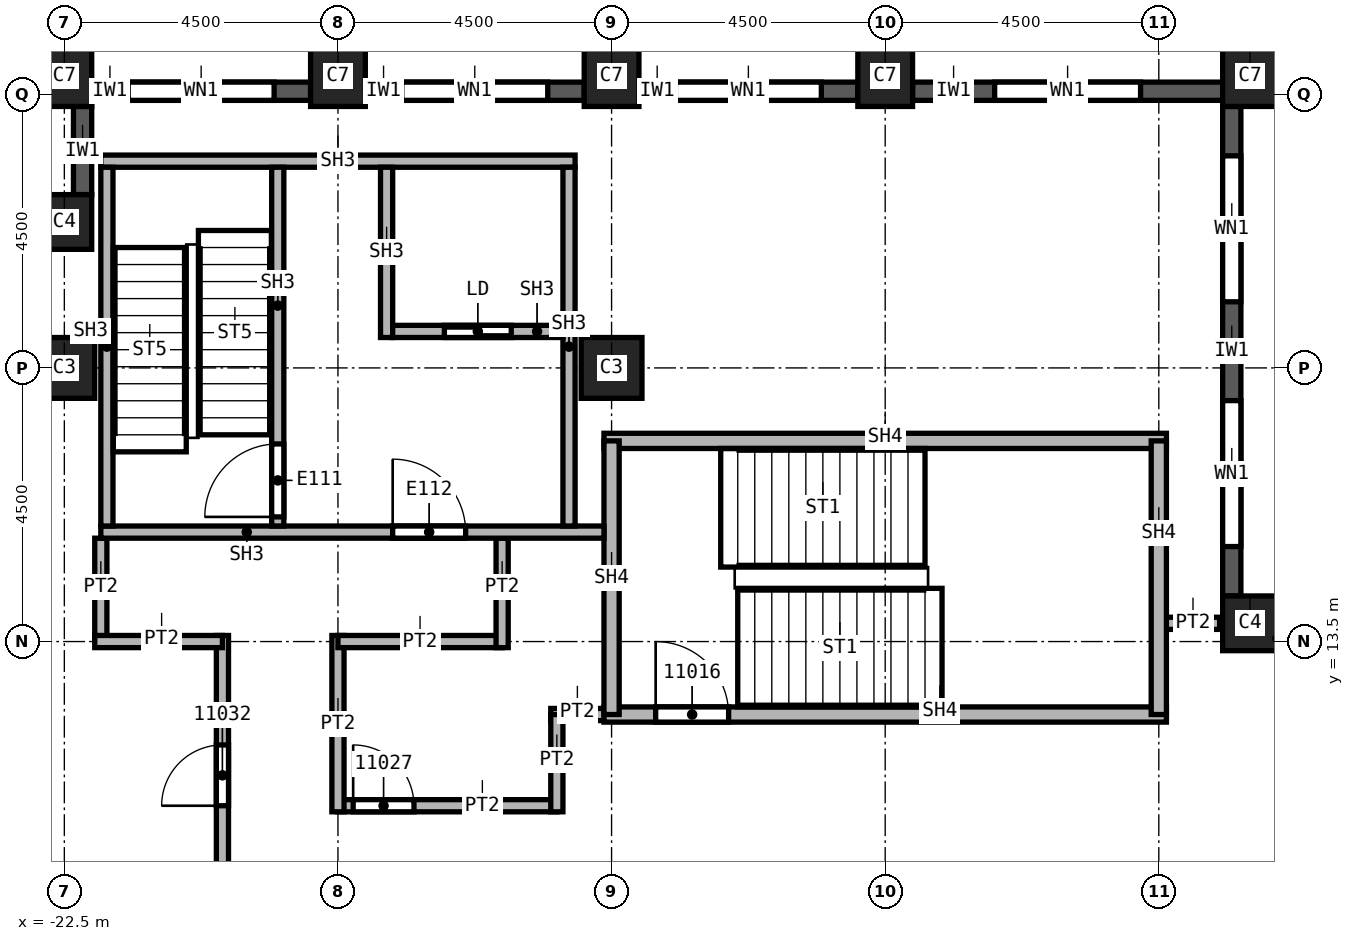
"""IFC4 building model, lengths in metres.
Left out: names, types, materials, properties, quantities, classifications, styles, units other than length and angle.
Written with IfcOpenShell. Run it as: python <this file> out.ifc"""

import sys

from ifc_helpers import new_model, si_unit, direction, frame, frame_2d, origin, origin_2d, place, context, subcontext, project, spatial, rectangle, extrude, element, fill, save


model = new_model("IFC4")
c1 = context("Model", 3, precision=1e-05, world=origin(), true_north=direction((0.0, 1.0)))
c2 = subcontext(c1, "Body", "Model", "MODEL_VIEW")
j1 = project(units=[si_unit("LENGTHUNIT", "METRE"), si_unit("PLANEANGLEUNIT", "RADIAN")], contexts=[c1])
p1 = place(None, origin())
s1 = spatial("IfcSite", under=j1, at=p1, CompositionType="ELEMENT")
p2 = place(p1, origin())
s2 = spatial("IfcBuilding", under=s1, at=p2, CompositionType="ELEMENT")
p3 = place(p2, frame((0.0, 0.0, 188.0)))
s3 = spatial("IfcBuildingStorey", under=s2, at=p3, CompositionType="ELEMENT", Elevation=188.0)
for number, where, z_axis, x_axis in (
    (1, (-13.5, 18.0, 0.0), (0.0, 0.0, 1.0), (1.0, 0.0, 0.0)),
    (2, (-22.5, 18.0, 0.0), (0.0, 0.0, 1.0), (1.0, 0.0, 0.0)),
):
    element("IfcColumn", number, at=place(p3, frame(where, z_axis=z_axis, x_axis=x_axis)), inside=s3, PredefinedType="COLUMN", context=c2, shape_type="SweptSolid", body=[
        extrude(rectangle(XDim=1.0, YDim=1.0, at=origin_2d()), origin(), (0.0, 0.0, 1.0), 3.72),
    ])
for number, where, z_axis, x_axis in (
    (3, (-3.0, 22.8, 0.0), (0.0, 0.0, 1.0), (1.0, 0.0, 0.0)),
    (4, (-9.0, 22.8, 0.0), (0.0, 0.0, 1.0), (1.0, 0.0, 0.0)),
    (5, (-13.5, 22.8, 0.0), (0.0, 0.0, 1.0), (1.0, 0.0, 0.0)),
    (6, (-18.0, 22.8, 0.0), (0.0, 0.0, 1.0), (1.0, 0.0, 0.0)),
    (7, (-22.5, 22.8, 0.0), (0.0, 0.0, 1.0), (1.0, 0.0, 0.0)),
):
    element("IfcColumn", number, at=place(p3, frame(where, z_axis=z_axis, x_axis=x_axis)), inside=s3, PredefinedType="COLUMN", context=c2, shape_type="SweptSolid", body=[
        extrude(rectangle(XDim=0.9, YDim=1.0, at=origin_2d()), origin(), (0.0, 0.0, 1.0), 3.72),
    ])
for number, where, z_axis, x_axis in (
    (8, (-3.0, 13.8, 0.0), (0.0, 0.0, 1.0), (1.0, 0.0, 0.0)),
    (9, (-22.5, 20.4, 0.0), (0.0, 0.0, 1.0), (1.0, 0.0, 0.0)),
):
    element("IfcColumn", number, at=place(p3, frame(where, z_axis=z_axis, x_axis=x_axis)), inside=s3, PredefinedType="COLUMN", context=c2, shape_type="SweptSolid", body=[
        extrude(rectangle(XDim=0.9, YDim=0.9, at=origin_2d()), origin(), (0.0, 0.0, 1.0), 3.72),
    ])
p4 = place(p3, frame((-3.3, 14.25, 0.0), z_axis=(0.0, 0.0, 1.0), x_axis=(0.0, 1.0, 0.0)))
e10 = element("IfcWall", 10, at=p4, inside=s3, PredefinedType="SOLIDWALL", context=c2, shape_type="SweptSolid", body=[
    extrude(rectangle(XDim=8.05, YDim=0.3, at=frame_2d((4.025, 0.0))), origin(), (0.0, 0.0, 1.0), 3.12),
])
p5 = place(p4, frame((0.812, 0.0, 0.8)))
e11 = element("IfcOpeningElement", 11, at=p5, cuts=e10, PredefinedType="OPENING", context=c2, shape_type="SweptSolid", body=[
    extrude(rectangle(XDim=2.4, YDim=1.95, at=frame_2d((1.2, 0.975))), frame((0.0, 0.15, 0.0), z_axis=(0.0, -1.0, 0.0), x_axis=(1.0, 0.0, 0.0)), (0.0, 0.0, 1.0), 0.3),
])
p6 = place(p4, frame((4.837, 0.0, 0.8)))
e12 = element("IfcOpeningElement", 12, at=p6, cuts=e10, PredefinedType="OPENING", context=c2, shape_type="SweptSolid", body=[
    extrude(rectangle(XDim=2.4, YDim=1.95, at=frame_2d((1.2, 0.975))), frame((0.0, 0.15, 0.0), z_axis=(0.0, -1.0, 0.0), x_axis=(1.0, 0.0, 0.0)), (0.0, 0.0, 1.0), 0.3),
])
p7 = place(p3, frame((-3.45, 22.55, 0.0), z_axis=(0.0, 0.0, 1.0), x_axis=(-1.0, 0.0, 0.0)))
e13 = element("IfcWall", 13, at=p7, inside=s3, PredefinedType="SOLIDWALL", context=c2, shape_type="SweptSolid", body=[
    extrude(rectangle(XDim=5.1, YDim=0.3, at=frame_2d((2.55, 0.0))), origin(), (0.0, 0.0, 1.0), 3.12),
])
p8 = place(p7, frame((1.35, 0.0, 0.8)))
e14 = element("IfcOpeningElement", 14, at=p8, cuts=e13, PredefinedType="OPENING", context=c2, shape_type="SweptSolid", body=[
    extrude(rectangle(XDim=2.4, YDim=1.95, at=frame_2d((1.2, 0.975))), frame((0.0, 0.15, 0.0), z_axis=(0.0, -1.0, 0.0), x_axis=(1.0, 0.0, 0.0)), (0.0, 0.0, 1.0), 0.3),
])
p9 = place(p3, frame((-9.45, 22.55, 0.0), z_axis=(0.0, 0.0, 1.0), x_axis=(-1.0, 0.0, 0.0)))
e15 = element("IfcWall", 15, at=p9, inside=s3, PredefinedType="SOLIDWALL", context=c2, shape_type="SweptSolid", body=[
    extrude(rectangle(XDim=3.6, YDim=0.3, at=frame_2d((1.8, 0.0))), origin(), (0.0, 0.0, 1.0), 3.12),
])
p10 = place(p9, frame((0.6, 0.0, 0.8)))
e16 = element("IfcOpeningElement", 16, at=p10, cuts=e15, PredefinedType="OPENING", context=c2, shape_type="SweptSolid", body=[
    extrude(rectangle(XDim=2.4, YDim=1.95, at=frame_2d((1.2, 0.975))), frame((0.0, 0.15, 0.0), z_axis=(0.0, -1.0, 0.0), x_axis=(1.0, 0.0, 0.0)), (0.0, 0.0, 1.0), 0.3),
])
p11 = place(p3, frame((-13.95, 22.55, 0.0), z_axis=(0.0, 0.0, 1.0), x_axis=(-1.0, 0.0, 0.0)))
e17 = element("IfcWall", 17, at=p11, inside=s3, PredefinedType="SOLIDWALL", context=c2, shape_type="SweptSolid", body=[
    extrude(rectangle(XDim=3.6, YDim=0.3, at=frame_2d((1.8, 0.0))), origin(), (0.0, 0.0, 1.0), 3.12),
])
p12 = place(p11, frame((0.6, 0.0, 0.8)))
e18 = element("IfcOpeningElement", 18, at=p12, cuts=e17, PredefinedType="OPENING", context=c2, shape_type="SweptSolid", body=[
    extrude(rectangle(XDim=2.4, YDim=1.95, at=frame_2d((1.2, 0.975))), frame((0.0, 0.15, 0.0), z_axis=(0.0, -1.0, 0.0), x_axis=(1.0, 0.0, 0.0)), (0.0, 0.0, 1.0), 0.3),
])
p13 = place(p3, frame((-18.45, 22.55, 0.0), z_axis=(0.0, 0.0, 1.0), x_axis=(-1.0, 0.0, 0.0)))
e19 = element("IfcWall", 19, at=p13, inside=s3, PredefinedType="SOLIDWALL", context=c2, shape_type="SweptSolid", body=[
    extrude(rectangle(XDim=3.6, YDim=0.3, at=frame_2d((1.8, 0.0))), origin(), (0.0, 0.0, 1.0), 3.12),
])
p14 = place(p13, frame((0.6, 0.0, 0.8)))
e20 = element("IfcOpeningElement", 20, at=p14, cuts=e19, PredefinedType="OPENING", context=c2, shape_type="SweptSolid", body=[
    extrude(rectangle(XDim=2.4, YDim=1.95, at=frame_2d((1.2, 0.975))), frame((0.0, 0.15, 0.0), z_axis=(0.0, -1.0, 0.0), x_axis=(1.0, 0.0, 0.0)), (0.0, 0.0, 1.0), 0.3),
])
p15 = place(p3, frame((-22.2, 22.3, 0.0), z_axis=(0.0, 0.0, 1.0), x_axis=(0.0, -1.0, 0.0)))
e21 = element("IfcWall", 21, at=p15, inside=s3, PredefinedType="SOLIDWALL", context=c2, shape_type="SweptSolid", body=[
    extrude(rectangle(XDim=1.45, YDim=0.3, at=frame_2d((0.725, 0.0))), origin(), (0.0, 0.0, 1.0), 3.12),
])
p16 = place(p3, frame((-21.9, 13.5, 0.0), z_axis=(0.0, 0.0, 1.0), x_axis=(0.0, 1.0, 0.0)))
e22 = element("IfcWall", 22, at=p16, inside=s3, PredefinedType="PARTITIONING", context=c2, shape_type="SweptSolid", body=[
    extrude(rectangle(XDim=1.7, YDim=0.2, at=frame_2d((0.85, 0.0))), origin(), (0.0, 0.0, 1.0), 3.72),
])
p17 = place(p3, frame((-19.9, 3.65, 0.0), z_axis=(0.0, 0.0, 1.0), x_axis=(0.0, 1.0, 0.0)))
e23 = element("IfcWall", 23, at=p17, inside=s3, PredefinedType="PARTITIONING", context=c2, shape_type="SweptSolid", body=[
    extrude(rectangle(XDim=9.95, YDim=0.2, at=frame_2d((4.975, 0.0))), origin(), (0.0, 0.0, 1.0), 3.72),
])
p18 = place(p17, frame((7.15, 0.0, 0.0)))
e24 = element("IfcOpeningElement", 24, at=p18, cuts=e23, PredefinedType="OPENING", context=c2, shape_type="SweptSolid", body=[
    extrude(rectangle(XDim=1.0, YDim=2.1, at=frame_2d((0.5, 1.05))), frame((0.0, 0.1, 0.0), z_axis=(0.0, -1.0, 0.0), x_axis=(1.0, 0.0, 0.0)), (0.0, 0.0, 1.0), 0.2),
])
p19 = place(p3, frame((-19.9, 13.5, 0.0), z_axis=(0.0, 0.0, 1.0), x_axis=(-1.0, 0.0, 0.0)))
e25 = element("IfcWall", 25, at=p19, inside=s3, PredefinedType="PARTITIONING", context=c2, shape_type="SweptSolid", body=[
    extrude(rectangle(XDim=2.1, YDim=0.2, at=frame_2d((1.05, 0.0))), origin(), (0.0, 0.0, 1.0), 3.72),
])
p20 = place(p3, frame((-18.0, 10.8, 0.0), z_axis=(0.0, 0.0, 1.0), x_axis=(1.0, 0.0, 0.0)))
e26 = element("IfcWall", 26, at=p20, inside=s3, PredefinedType="PARTITIONING", context=c2, shape_type="SweptSolid", body=[
    extrude(rectangle(XDim=3.6, YDim=0.2, at=frame_2d((1.8, 0.0))), origin(), (0.0, 0.0, 1.0), 3.72),
])
p21 = place(p20, frame((0.25, 0.0, 0.0)))
e27 = element("IfcOpeningElement", 27, at=p21, cuts=e26, PredefinedType="OPENING", context=c2, shape_type="SweptSolid", body=[
    extrude(rectangle(XDim=1.0, YDim=2.1, at=frame_2d((0.5, 1.05))), frame((0.0, 0.1, 0.0), z_axis=(0.0, -1.0, 0.0), x_axis=(1.0, 0.0, 0.0)), (0.0, 0.0, 1.0), 0.2),
])
p22 = place(p3, frame((-18.0, 13.6, 0.0), z_axis=(0.0, 0.0, 1.0), x_axis=(0.0, -1.0, 0.0)))
e28 = element("IfcWall", 28, at=p22, inside=s3, PredefinedType="PARTITIONING", context=c2, shape_type="SweptSolid", body=[
    extrude(rectangle(XDim=2.9, YDim=0.2, at=frame_2d((1.45, 0.0))), origin(), (0.0, 0.0, 1.0), 3.72),
])
p23 = place(p3, frame((-15.3, 13.5, 0.0), z_axis=(0.0, 0.0, 1.0), x_axis=(-1.0, 0.0, 0.0)))
e29 = element("IfcWall", 29, at=p23, inside=s3, PredefinedType="PARTITIONING", context=c2, shape_type="SweptSolid", body=[
    extrude(rectangle(XDim=2.7, YDim=0.2, at=frame_2d((1.35, 0.0))), origin(), (0.0, 0.0, 1.0), 3.72),
])
p24 = place(p3, frame((-15.3, 15.2, 0.0), z_axis=(0.0, 0.0, 1.0), x_axis=(0.0, -1.0, 0.0)))
e30 = element("IfcWall", 30, at=p24, inside=s3, PredefinedType="PARTITIONING", context=c2, shape_type="SweptSolid", body=[
    extrude(rectangle(XDim=1.8, YDim=0.2, at=frame_2d((0.9, 0.0))), origin(), (0.0, 0.0, 1.0), 3.72),
])
p25 = place(p3, frame((-14.5, 12.3, 0.0), z_axis=(0.0, 0.0, 1.0), x_axis=(1.0, 0.0, 0.0)))
e31 = element("IfcWall", 31, at=p25, inside=s3, PredefinedType="PARTITIONING", context=c2, shape_type="SweptSolid", body=[
    extrude(rectangle(XDim=1.125, YDim=0.2, at=frame_2d((0.562, 0.0))), origin(), (0.0, 0.0, 1.0), 3.72),
])
p26 = place(p3, frame((-14.4, 10.7, 0.0), z_axis=(0.0, 0.0, 1.0), x_axis=(0.0, 1.0, 0.0)))
e32 = element("IfcWall", 32, at=p26, inside=s3, PredefinedType="PARTITIONING", context=c2, shape_type="SweptSolid", body=[
    extrude(rectangle(XDim=1.6, YDim=0.2, at=frame_2d((0.8, 0.0))), origin(), (0.0, 0.0, 1.0), 3.72),
])
p27 = place(p3, frame((-4.5, 13.8, 0.0), z_axis=(0.0, 0.0, 1.0), x_axis=(1.0, 0.0, 0.0)))
e33 = element("IfcWall", 33, at=p27, inside=s3, PredefinedType="PARTITIONING", context=c2, shape_type="SweptSolid", body=[
    extrude(rectangle(XDim=1.0, YDim=0.2, at=frame_2d((0.5, 0.0))), origin(), (0.0, 0.0, 1.0), 3.72),
])
p28 = place(p3, frame((-13.625, 12.3, 0.0), z_axis=(0.0, 0.0, 1.0), x_axis=(1.0, 0.0, 0.0)))
e34 = element("IfcWall", 34, at=p28, inside=s3, PredefinedType="SOLIDWALL", context=c2, shape_type="SweptSolid", body=[
    extrude(rectangle(XDim=9.25, YDim=0.25, at=frame_2d((4.625, 0.0))), origin(), (0.0, 0.0, 1.0), 3.72),
])
p29 = place(p28, frame((0.85, 0.0, 0.0)))
e35 = element("IfcOpeningElement", 35, at=p29, cuts=e34, PredefinedType="OPENING", context=c2, shape_type="SweptSolid", body=[
    extrude(rectangle(XDim=1.2, YDim=2.1, at=frame_2d((0.6, 1.05))), frame((0.0, 0.125, 0.0), z_axis=(0.0, -1.0, 0.0), x_axis=(1.0, 0.0, 0.0)), (0.0, 0.0, 1.0), 0.25),
])
p30 = place(p3, frame((-13.625, 16.8, 0.0), z_axis=(0.0, 0.0, 1.0), x_axis=(1.0, 0.0, 0.0)))
e36 = element("IfcWall", 36, at=p30, inside=s3, PredefinedType="SOLIDWALL", context=c2, shape_type="SweptSolid", body=[
    extrude(rectangle(XDim=9.25, YDim=0.25, at=frame_2d((4.625, 0.0))), origin(), (0.0, 0.0, 1.0), 3.72),
])
for number, where, z_axis, x_axis in (
    (37, (-13.5, 12.3, 0.0), (0.0, 0.0, 1.0), (0.0, 1.0, 0.0)),
    (38, (-4.5, 16.8, 0.0), (0.0, 0.0, 1.0), (0.0, -1.0, 0.0)),
):
    element("IfcWall", number, at=place(p3, frame(where, z_axis=z_axis, x_axis=x_axis)), inside=s3, PredefinedType="SOLIDWALL", context=c2, shape_type="SweptSolid", body=[
        extrude(rectangle(XDim=4.5, YDim=0.25, at=frame_2d((2.25, 0.0))), origin(), (0.0, 0.0, 1.0), 3.72),
    ])
p31 = place(p3, frame((-21.9, 15.3, 0.0), z_axis=(0.0, 0.0, 1.0), x_axis=(1.0, 0.0, 0.0)))
e39 = element("IfcWall", 39, at=p31, inside=s3, PredefinedType="SOLIDWALL", context=c2, shape_type="SweptSolid", body=[
    extrude(rectangle(XDim=8.275, YDim=0.2, at=frame_2d((4.137, 0.0))), origin(), (0.0, 0.0, 1.0), 3.72),
])
p32 = place(p31, frame((4.8, 0.0, 0.0)))
e40 = element("IfcOpeningElement", 40, at=p32, cuts=e39, PredefinedType="OPENING", context=c2, shape_type="SweptSolid", body=[
    extrude(rectangle(XDim=1.2, YDim=2.1, at=frame_2d((0.6, 1.05))), frame((0.0, 0.1, 0.0), z_axis=(0.0, -1.0, 0.0), x_axis=(1.0, 0.0, 0.0)), (0.0, 0.0, 1.0), 0.2),
])
p33 = place(p3, frame((-21.9, 21.4, 0.0), z_axis=(0.0, 0.0, 1.0), x_axis=(1.0, 0.0, 0.0)))
e41 = element("IfcWall", 41, at=p33, inside=s3, PredefinedType="SOLIDWALL", context=c2, shape_type="SweptSolid", body=[
    extrude(rectangle(XDim=7.8, YDim=0.2, at=frame_2d((3.9, 0.0))), origin(), (0.0, 0.0, 1.0), 3.72),
])
for number, where, z_axis, x_axis in (
    (42, (-21.8, 15.4, 0.0), (0.0, 0.0, 1.0), (0.0, 1.0, 0.0)),
    (43, (-14.2, 15.4, 0.0), (0.0, 0.0, 1.0), (0.0, 1.0, 0.0)),
):
    element("IfcWall", number, at=place(p3, frame(where, z_axis=z_axis, x_axis=x_axis)), inside=s3, PredefinedType="SOLIDWALL", context=c2, shape_type="SweptSolid", body=[
        extrude(rectangle(XDim=5.9, YDim=0.2, at=frame_2d((2.95, 0.0))), origin(), (0.0, 0.0, 1.0), 3.72),
    ])
p34 = place(p3, frame((-18.99, 15.4, 0.0), z_axis=(0.0, 0.0, 1.0), x_axis=(0.0, 1.0, 0.0)))
e44 = element("IfcWall", 44, at=p34, inside=s3, PredefinedType="SOLIDWALL", context=c2, shape_type="SweptSolid", body=[
    extrude(rectangle(XDim=5.9, YDim=0.2, at=frame_2d((2.95, 0.0))), origin(), (0.0, 0.0, 1.0), 3.72),
])
p35 = place(p34, frame((0.15, 0.0, 0.0)))
e45 = element("IfcOpeningElement", 45, at=p35, cuts=e44, PredefinedType="OPENING", context=c2, shape_type="SweptSolid", body=[
    extrude(rectangle(XDim=1.2, YDim=2.1, at=frame_2d((0.6, 1.05))), frame((0.0, 0.1, 0.0), z_axis=(0.0, -1.0, 0.0), x_axis=(1.0, 0.0, 0.0)), (0.0, 0.0, 1.0), 0.2),
])
p36 = place(p3, frame((-17.2, 18.5, 0.0), z_axis=(0.0, 0.0, 1.0), x_axis=(0.0, 1.0, 0.0)))
e46 = element("IfcWall", 46, at=p36, inside=s3, PredefinedType="SOLIDWALL", context=c2, shape_type="SweptSolid", body=[
    extrude(rectangle(XDim=2.8, YDim=0.2, at=frame_2d((1.4, 0.0))), origin(), (0.0, 0.0, 1.0), 3.72),
])
p37 = place(p3, frame((-17.1, 18.6, 0.0), z_axis=(0.0, 0.0, 1.0), x_axis=(1.0, 0.0, 0.0)))
e47 = element("IfcWall", 47, at=p37, inside=s3, PredefinedType="SOLIDWALL", context=c2, shape_type="SweptSolid", body=[
    extrude(rectangle(XDim=2.8, YDim=0.2, at=frame_2d((1.4, 0.0))), origin(), (0.0, 0.0, 1.0), 3.72),
])
p38 = place(p37, frame((0.85, 0.0, 0.0)))
e48 = element("IfcOpeningElement", 48, at=p38, cuts=e47, PredefinedType="OPENING", context=c2, shape_type="SweptSolid", body=[
    extrude(rectangle(XDim=1.1, YDim=2.1, at=frame_2d((0.55, 1.05))), frame((0.0, 0.1, 0.0), z_axis=(0.0, -1.0, 0.0), x_axis=(1.0, 0.0, 0.0)), (0.0, 0.0, 1.0), 0.2),
])
p39 = place(p5, origin())
e49 = element("IfcWindow", 49, at=p39, inside=s3, PartitioningType="SINGLE_PANEL", PredefinedType="WINDOW", context=c2, shape_type="SweptSolid", body=[
    extrude(rectangle(XDim=2.4, YDim=1.95, at=frame_2d((1.2, 0.975))), frame((0.0, 0.03, 0.0), z_axis=(0.0, -1.0, 0.0), x_axis=(1.0, 0.0, 0.0)), (0.0, 0.0, 1.0), 0.06),
])
fill(e11, e49)
p40 = place(p6, origin())
e50 = element("IfcWindow", 50, at=p40, inside=s3, PartitioningType="SINGLE_PANEL", PredefinedType="WINDOW", context=c2, shape_type="SweptSolid", body=[
    extrude(rectangle(XDim=2.4, YDim=1.95, at=frame_2d((1.2, 0.975))), frame((0.0, 0.03, 0.0), z_axis=(0.0, -1.0, 0.0), x_axis=(1.0, 0.0, 0.0)), (0.0, 0.0, 1.0), 0.06),
])
fill(e12, e50)
p41 = place(p8, origin())
e51 = element("IfcWindow", 51, at=p41, inside=s3, PartitioningType="SINGLE_PANEL", PredefinedType="WINDOW", context=c2, shape_type="SweptSolid", body=[
    extrude(rectangle(XDim=2.4, YDim=1.95, at=frame_2d((1.2, 0.975))), frame((0.0, 0.03, 0.0), z_axis=(0.0, -1.0, 0.0), x_axis=(1.0, 0.0, 0.0)), (0.0, 0.0, 1.0), 0.06),
])
fill(e14, e51)
p42 = place(p10, origin())
e52 = element("IfcWindow", 52, at=p42, inside=s3, PartitioningType="SINGLE_PANEL", PredefinedType="WINDOW", context=c2, shape_type="SweptSolid", body=[
    extrude(rectangle(XDim=2.4, YDim=1.95, at=frame_2d((1.2, 0.975))), frame((0.0, 0.03, 0.0), z_axis=(0.0, -1.0, 0.0), x_axis=(1.0, 0.0, 0.0)), (0.0, 0.0, 1.0), 0.06),
])
fill(e16, e52)
p43 = place(p12, origin())
e53 = element("IfcWindow", 53, at=p43, inside=s3, PartitioningType="SINGLE_PANEL", PredefinedType="WINDOW", context=c2, shape_type="SweptSolid", body=[
    extrude(rectangle(XDim=2.4, YDim=1.95, at=frame_2d((1.2, 0.975))), frame((0.0, 0.03, 0.0), z_axis=(0.0, -1.0, 0.0), x_axis=(1.0, 0.0, 0.0)), (0.0, 0.0, 1.0), 0.06),
])
fill(e18, e53)
p44 = place(p14, origin())
e54 = element("IfcWindow", 54, at=p44, inside=s3, PartitioningType="SINGLE_PANEL", PredefinedType="WINDOW", context=c2, shape_type="SweptSolid", body=[
    extrude(rectangle(XDim=2.4, YDim=1.95, at=frame_2d((1.2, 0.975))), frame((0.0, 0.03, 0.0), z_axis=(0.0, -1.0, 0.0), x_axis=(1.0, 0.0, 0.0)), (0.0, 0.0, 1.0), 0.06),
])
fill(e20, e54)
p45 = place(p29, origin())
e55 = element("IfcDoor", 55, at=p45, inside=s3, OperationType="SINGLE_SWING_LEFT", PredefinedType="DOOR", context=c2, shape_type="SweptSolid", body=[
    extrude(rectangle(XDim=1.2, YDim=2.1, at=frame_2d((0.6, 1.05))), frame((0.0, 0.025, 0.0), z_axis=(0.0, -1.0, 0.0), x_axis=(1.0, 0.0, 0.0)), (0.0, 0.0, 1.0), 0.05),
])
fill(e35, e55)
p46 = place(p21, origin())
e56 = element("IfcDoor", 56, at=p46, inside=s3, OperationType="SINGLE_SWING_RIGHT", PredefinedType="DOOR", context=c2, shape_type="SweptSolid", body=[
    extrude(rectangle(XDim=1.0, YDim=2.1, at=frame_2d((0.5, 1.05))), frame((0.0, 0.025, 0.0), z_axis=(0.0, -1.0, 0.0), x_axis=(1.0, 0.0, 0.0)), (0.0, 0.0, 1.0), 0.05),
])
fill(e27, e56)
p47 = place(p18, origin())
e57 = element("IfcDoor", 57, at=p47, inside=s3, OperationType="SINGLE_SWING_LEFT", PredefinedType="DOOR", context=c2, shape_type="SweptSolid", body=[
    extrude(rectangle(XDim=1.0, YDim=2.1, at=frame_2d((0.5, 1.05))), frame((0.0, 0.025, 0.0), z_axis=(0.0, -1.0, 0.0), x_axis=(1.0, 0.0, 0.0)), (0.0, 0.0, 1.0), 0.05),
])
fill(e24, e57)
p48 = place(p35, origin())
e58 = element("IfcDoor", 58, at=p48, inside=s3, OperationType="SINGLE_SWING_LEFT", PredefinedType="DOOR", context=c2, shape_type="SweptSolid", body=[
    extrude(rectangle(XDim=1.2, YDim=2.1, at=frame_2d((0.6, 1.05))), frame((0.0, 0.025, 0.0), z_axis=(0.0, -1.0, 0.0), x_axis=(1.0, 0.0, 0.0)), (0.0, 0.0, 1.0), 0.05),
])
fill(e45, e58)
p49 = place(p38, origin())
e59 = element("IfcDoor", 59, at=p49, inside=s3, OperationType="SLIDING_TO_LEFT", PredefinedType="DOOR", context=c2, shape_type="SweptSolid", body=[
    extrude(rectangle(XDim=1.1, YDim=2.1, at=frame_2d((0.55, 1.05))), frame((0.0, 0.025, 0.0), z_axis=(0.0, -1.0, 0.0), x_axis=(1.0, 0.0, 0.0)), (0.0, 0.0, 1.0), 0.05),
])
fill(e48, e59)
p50 = place(p32, origin())
e60 = element("IfcDoor", 60, at=p50, inside=s3, OperationType="SINGLE_SWING_RIGHT", PredefinedType="DOOR", context=c2, shape_type="SweptSolid", body=[
    extrude(rectangle(XDim=1.2, YDim=2.1, at=frame_2d((0.6, 1.05))), frame((0.0, 0.025, 0.0), z_axis=(0.0, -1.0, 0.0), x_axis=(1.0, 0.0, 0.0)), (0.0, 0.0, 1.0), 0.05),
])
fill(e40, e60)
save(model, sys.argv[1])
